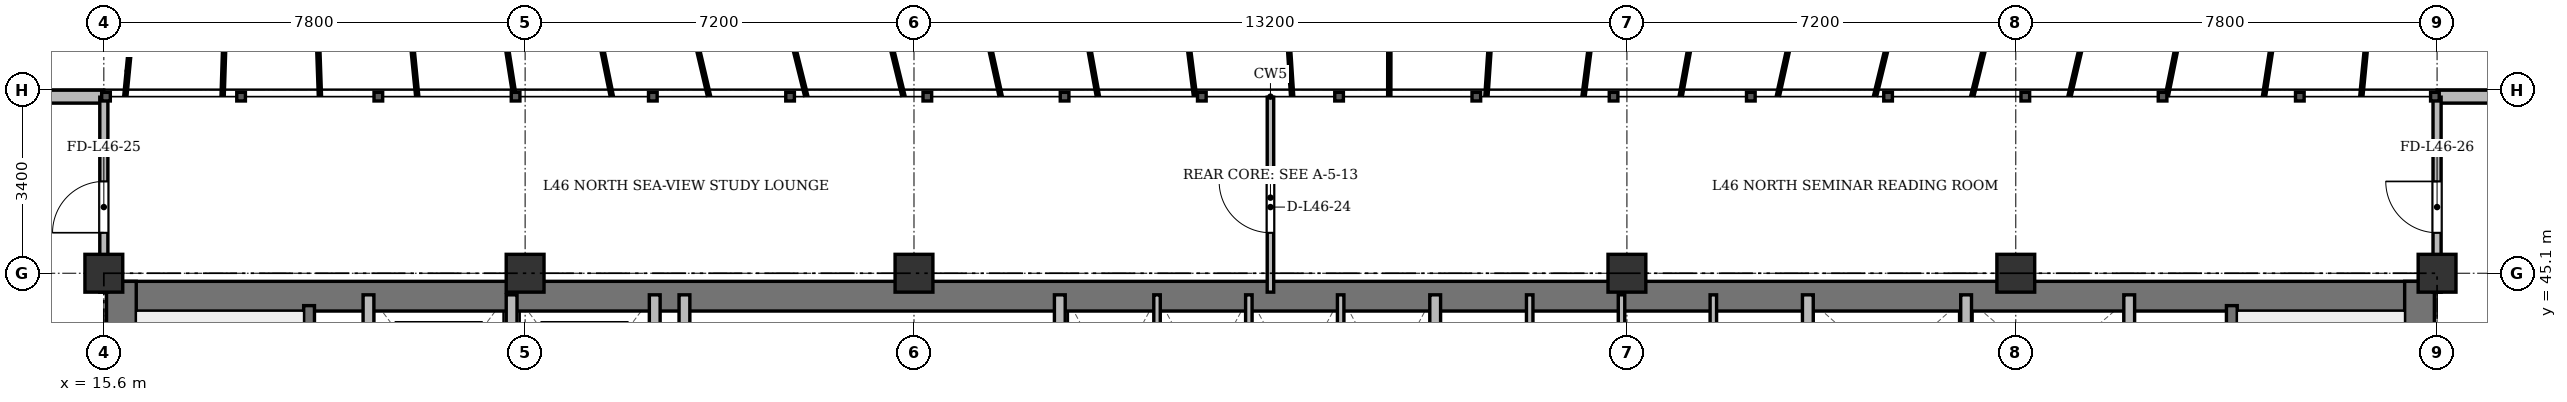
"""IFC4 building model, lengths in metres.
Left out: names, types, materials, properties, quantities, classifications, styles, units other than length and angle.
Written with IfcOpenShell. Run it as: python <this file> out.ifc"""

import sys

from ifc_helpers import new_model, si_unit, direction, frame, frame_2d, origin, origin_2d, place, context, subcontext, project, spatial, rectangle, extrude, source, transform, mapped, element, fill, save


model = new_model("IFC4")
c1 = context("Model", 3, precision=1e-05, world=origin(), true_north=direction((0.0, 1.0)))
c2 = subcontext(c1, "Body", "Model", "MODEL_VIEW")
j1 = project(units=[si_unit("LENGTHUNIT", "METRE"), si_unit("PLANEANGLEUNIT", "RADIAN")], contexts=[c1])
p1 = place(None, origin())
s1 = spatial("IfcSite", under=j1, at=p1, CompositionType="ELEMENT")
p2 = place(p1, origin())
s2 = spatial("IfcBuilding", under=s1, at=p2, CompositionType="ELEMENT")
p3 = place(p2, frame((0.0, 0.0, 175.3)))
s3 = spatial("IfcBuildingStorey", under=s2, at=p3, CompositionType="ELEMENT", Elevation=175.3)
m1 = source(origin(), c2, "Body", "SweptSolid", [
    extrude(rectangle(XDim=0.7, YDim=0.7, at=origin_2d()), origin(), (0.0, 0.0, 1.0), 3.6),
])
for number, where, z_axis, x_axis in (
    (1, (15.6, 45.1, 0.0), (0.0, 0.0, 1.0), (1.0, 0.0, 0.0)),
    (2, (23.4, 45.1, 0.0), (0.0, 0.0, 1.0), (1.0, 0.0, 0.0)),
    (3, (30.6, 45.1, 0.0), (0.0, 0.0, 1.0), (1.0, 0.0, 0.0)),
    (4, (43.8, 45.1, 0.0), (0.0, 0.0, 1.0), (1.0, 0.0, 0.0)),
    (5, (51.0, 45.1, 0.0), (0.0, 0.0, 1.0), (1.0, 0.0, 0.0)),
    (6, (58.8, 45.1, 0.0), (0.0, 0.0, 1.0), (1.0, 0.0, 0.0)),
):
    element("IfcColumn", number, at=place(p3, frame(where, z_axis=z_axis, x_axis=x_axis)), inside=s3, PredefinedType="COLUMN", context=c2, shape_type="MappedRepresentation", body=[
        mapped(m1, transform((0.0, 0.0, 0.0), x_axis=(1.0, 0.0, 0.0), y_axis=(0.0, 1.0, 0.0), z_axis=(0.0, 0.0, 1.0), scale=1.0)),
    ])
p4 = place(p3, frame((10.9, 48.37, 0.0), z_axis=(0.0, 0.0, 1.0), x_axis=(1.0, 0.0, 0.0)))
e7 = element("IfcWall", 7, at=p4, inside=s3, PredefinedType="SOLIDWALL", context=c2, shape_type="SweptSolid", body=[
    extrude(rectangle(XDim=4.7, YDim=0.24, at=frame_2d((2.35, 0.0))), origin(), (0.0, 0.0, 1.0), 3.35),
])
p5 = place(p4, frame((2.132, 0.0, 0.9)))
e8 = element("IfcOpeningElement", 8, at=p5, cuts=e7, PredefinedType="OPENING", context=c2, shape_type="SweptSolid", body=[
    extrude(rectangle(XDim=1.2, YDim=1.65, at=frame_2d((0.6, 0.825))), frame((0.0, 0.13, 0.0), z_axis=(0.0, -1.0, 0.0), x_axis=(1.0, 0.0, 0.0)), (0.0, 0.0, 1.0), 0.26),
])
p6 = place(p3, frame((58.8, 48.37, 0.0), z_axis=(0.0, 0.0, 1.0), x_axis=(1.0, 0.0, 0.0)))
e9 = element("IfcWall", 9, at=p6, inside=s3, PredefinedType="SOLIDWALL", context=c2, shape_type="SweptSolid", body=[
    extrude(rectangle(XDim=4.7, YDim=0.24, at=frame_2d((2.35, 0.0))), origin(), (0.0, 0.0, 1.0), 3.35),
])
p7 = place(p6, frame((1.659, 0.0, 0.9)))
e10 = element("IfcOpeningElement", 10, at=p7, cuts=e9, PredefinedType="OPENING", context=c2, shape_type="SweptSolid", body=[
    extrude(rectangle(XDim=1.2, YDim=1.65, at=frame_2d((0.6, 0.825))), frame((0.0, 0.13, 0.0), z_axis=(0.0, -1.0, 0.0), x_axis=(1.0, 0.0, 0.0)), (0.0, 0.0, 1.0), 0.26),
])
p8 = place(p3, frame((15.65, 44.675, 0.0), z_axis=(0.0, 0.0, 1.0), x_axis=(1.0, 0.0, 0.0)))
e11 = element("IfcWall", 11, at=p8, inside=s3, PredefinedType="SHEAR", context=c2, shape_type="SweptSolid", body=[
    extrude(rectangle(XDim=43.1, YDim=0.55, at=frame_2d((21.55, 0.0))), origin(), (0.0, 0.0, 1.0), 3.35),
])
for number, where, z_axis, x_axis in (
    (12, (15.925, 33.4, 0.0), (0.0, 0.0, 1.0), (0.0, 1.0, 0.0)),
    (13, (58.475, 33.4, 0.0), (0.0, 0.0, 1.0), (0.0, 1.0, 0.0)),
):
    element("IfcWall", number, at=place(p3, frame(where, z_axis=z_axis, x_axis=x_axis)), inside=s3, PredefinedType="SHEAR", context=c2, shape_type="SweptSolid", body=[
        extrude(rectangle(XDim=11.55, YDim=0.55, at=frame_2d((5.775, 0.0))), origin(), (0.0, 0.0, 1.0), 3.35),
    ])
p9 = place(p3, frame((19.4, 33.4, 0.0), z_axis=(0.0, 0.0, 1.0), x_axis=(0.0, 1.0, 0.0)))
e14 = element("IfcWall", 14, at=p9, inside=s3, PredefinedType="SHEAR", context=c2, shape_type="SweptSolid", body=[
    extrude(rectangle(XDim=11.1, YDim=0.2, at=frame_2d((5.55, 0.0))), origin(), (0.0, 0.0, 1.0), 3.35),
])
p10 = place(p9, frame((0.85, 0.0, 0.0)))
e15 = element("IfcOpeningElement", 15, at=p10, cuts=e14, PredefinedType="OPENING", context=c2, shape_type="SweptSolid", body=[
    extrude(rectangle(XDim=1.1, YDim=2.15, at=frame_2d((0.55, 1.075))), frame((0.0, 0.11, 0.0), z_axis=(0.0, -1.0, 0.0), x_axis=(1.0, 0.0, 0.0)), (0.0, 0.0, 1.0), 0.22),
])
p11 = place(p3, frame((55.0, 33.4, 0.0), z_axis=(0.0, 0.0, 1.0), x_axis=(0.0, 1.0, 0.0)))
e16 = element("IfcWall", 16, at=p11, inside=s3, PredefinedType="SHEAR", context=c2, shape_type="SweptSolid", body=[
    extrude(rectangle(XDim=11.1, YDim=0.2, at=frame_2d((5.55, 0.0))), origin(), (0.0, 0.0, 1.0), 3.35),
])
p12 = place(p11, frame((0.85, 0.0, 0.0)))
e17 = element("IfcOpeningElement", 17, at=p12, cuts=e16, PredefinedType="OPENING", context=c2, shape_type="SweptSolid", body=[
    extrude(rectangle(XDim=1.1, YDim=2.15, at=frame_2d((0.55, 1.075))), frame((0.0, 0.11, 0.0), z_axis=(0.0, -1.0, 0.0), x_axis=(1.0, 0.0, 0.0)), (0.0, 0.0, 1.0), 0.22),
])
for number, where, z_axis, x_axis in (
    (18, (20.5, 41.3, 0.0), (0.0, 0.0, 1.0), (0.0, 1.0, 0.0)),
    (19, (23.15, 41.3, 0.0), (0.0, 0.0, 1.0), (0.0, 1.0, 0.0)),
    (20, (25.8, 41.3, 0.0), (0.0, 0.0, 1.0), (0.0, 1.0, 0.0)),
):
    element("IfcWall", number, at=place(p3, frame(where, z_axis=z_axis, x_axis=x_axis)), inside=s3, PredefinedType="SOLIDWALL", context=c2, shape_type="SweptSolid", body=[
        extrude(rectangle(XDim=3.4, YDim=0.2, at=frame_2d((1.7, 0.0))), origin(), (0.0, 0.0, 1.0), 3.35),
    ])
for number, where, z_axis, x_axis in (
    (21, (26.35, 33.4, 0.0), (0.0, 0.0, 1.0), (0.0, 1.0, 0.0)),
    (22, (33.3, 33.4, 0.0), (0.0, 0.0, 1.0), (0.0, 1.0, 0.0)),
):
    element("IfcWall", number, at=place(p3, frame(where, z_axis=z_axis, x_axis=x_axis)), inside=s3, PredefinedType="SOLIDWALL", context=c2, shape_type="SweptSolid", body=[
        extrude(rectangle(XDim=11.3, YDim=0.2, at=frame_2d((5.65, 0.0))), origin(), (0.0, 0.0, 1.0), 2.75),
    ])
for number, where, z_axis, x_axis in (
    (23, (35.1, 41.5, 0.0), (0.0, 0.0, 1.0), (0.0, 1.0, 0.0)),
    (24, (36.8, 41.5, 0.0), (0.0, 0.0, 1.0), (0.0, 1.0, 0.0)),
    (25, (38.5, 41.5, 0.0), (0.0, 0.0, 1.0), (0.0, 1.0, 0.0)),
):
    element("IfcWall", number, at=place(p3, frame(where, z_axis=z_axis, x_axis=x_axis)), inside=s3, PredefinedType="PARTITIONING", context=c2, shape_type="SweptSolid", body=[
        extrude(rectangle(XDim=3.2, YDim=0.12, at=frame_2d((1.6, 0.0))), origin(), (0.0, 0.0, 1.0), 3.35),
    ])
p13 = place(p3, frame((40.25, 41.5, 0.0), z_axis=(0.0, 0.0, 1.0), x_axis=(0.0, 1.0, 0.0)))
e26 = element("IfcWall", 26, at=p13, inside=s3, PredefinedType="SOLIDWALL", context=c2, shape_type="SweptSolid", body=[
    extrude(rectangle(XDim=3.2, YDim=0.2, at=frame_2d((1.6, 0.0))), origin(), (0.0, 0.0, 1.0), 3.35),
])
p14 = place(p3, frame((42.0, 41.5, 0.0), z_axis=(0.0, 0.0, 1.0), x_axis=(0.0, 1.0, 0.0)))
e27 = element("IfcWall", 27, at=p14, inside=s3, PredefinedType="PARTITIONING", context=c2, shape_type="SweptSolid", body=[
    extrude(rectangle(XDim=3.2, YDim=0.12, at=frame_2d((1.6, 0.0))), origin(), (0.0, 0.0, 1.0), 3.35),
])
p15 = place(p3, frame((43.7, 41.5, 0.0), z_axis=(0.0, 0.0, 1.0), x_axis=(0.0, 1.0, 0.0)))
e28 = element("IfcWall", 28, at=p15, inside=s3, PredefinedType="PARTITIONING", context=c2, shape_type="SweptSolid", body=[
    extrude(rectangle(XDim=3.2, YDim=0.12, at=frame_2d((1.6, 0.0))), origin(), (0.0, 0.0, 1.0), 2.85),
])
p16 = place(p3, frame((45.4, 41.5, 0.0), z_axis=(0.0, 0.0, 1.0), x_axis=(0.0, 1.0, 0.0)))
e29 = element("IfcWall", 29, at=p16, inside=s3, PredefinedType="PARTITIONING", context=c2, shape_type="SweptSolid", body=[
    extrude(rectangle(XDim=3.2, YDim=0.12, at=frame_2d((1.6, 0.0))), origin(), (0.0, 0.0, 1.0), 3.35),
])
p17 = place(p3, frame((47.15, 33.4, 0.0), z_axis=(0.0, 0.0, 1.0), x_axis=(0.0, 1.0, 0.0)))
e30 = element("IfcWall", 30, at=p17, inside=s3, PredefinedType="SOLIDWALL", context=c2, shape_type="SweptSolid", body=[
    extrude(rectangle(XDim=11.3, YDim=0.2, at=frame_2d((5.65, 0.0))), origin(), (0.0, 0.0, 1.0), 2.75),
])
for number, where, z_axis, x_axis in (
    (31, (50.08, 42.05, 0.0), (0.0, 0.0, 1.0), (0.0, 1.0, 0.0)),
    (32, (53.1, 42.05, 0.0), (0.0, 0.0, 1.0), (0.0, 1.0, 0.0)),
):
    element("IfcWall", number, at=place(p3, frame(where, z_axis=z_axis, x_axis=x_axis)), inside=s3, PredefinedType="SOLIDWALL", context=c2, shape_type="SweptSolid", body=[
        extrude(rectangle(XDim=2.65, YDim=0.2, at=frame_2d((1.325, 0.0))), origin(), (0.0, 0.0, 1.0), 3.35),
    ])
p18 = place(p3, frame((37.2, 44.75, 0.0), z_axis=(0.0, 0.0, 1.0), x_axis=(0.0, 1.0, 0.0)))
e33 = element("IfcWall", 33, at=p18, inside=s3, PredefinedType="PARTITIONING", context=c2, shape_type="SweptSolid", body=[
    extrude(rectangle(XDim=3.61, YDim=0.12, at=frame_2d((1.805, 0.0))), origin(), (0.0, 0.0, 1.0), 2.75),
])
p19 = place(p18, frame((1.1, 0.0, 0.0)))
e34 = element("IfcOpeningElement", 34, at=p19, cuts=e33, PredefinedType="OPENING", context=c2, shape_type="SweptSolid", body=[
    extrude(rectangle(XDim=0.95, YDim=2.15, at=frame_2d((0.475, 1.075))), frame((0.0, 0.07, 0.0), z_axis=(0.0, -1.0, 0.0), x_axis=(1.0, 0.0, 0.0)), (0.0, 0.0, 1.0), 0.14),
])
p20 = place(p3, frame((15.6, 44.75, 0.0), z_axis=(0.0, 0.0, 1.0), x_axis=(0.0, 1.0, 0.0)))
e35 = element("IfcWall", 35, at=p20, inside=s3, PredefinedType="PARTITIONING", context=c2, shape_type="SweptSolid", body=[
    extrude(rectangle(XDim=3.61, YDim=0.15, at=frame_2d((1.805, 0.0))), origin(), (0.0, 0.0, 1.0), 2.85),
])
p21 = place(p20, frame((1.1, 0.0, 0.0)))
e36 = element("IfcOpeningElement", 36, at=p21, cuts=e35, PredefinedType="OPENING", context=c2, shape_type="SweptSolid", body=[
    extrude(rectangle(XDim=0.95, YDim=2.15, at=frame_2d((0.475, 1.075))), frame((0.0, 0.085, 0.0), z_axis=(0.0, -1.0, 0.0), x_axis=(1.0, 0.0, 0.0)), (0.0, 0.0, 1.0), 0.17),
])
p22 = place(p3, frame((58.8, 44.75, 0.0), z_axis=(0.0, 0.0, 1.0), x_axis=(0.0, 1.0, 0.0)))
e37 = element("IfcWall", 37, at=p22, inside=s3, PredefinedType="PARTITIONING", context=c2, shape_type="SweptSolid", body=[
    extrude(rectangle(XDim=3.61, YDim=0.15, at=frame_2d((1.805, 0.0))), origin(), (0.0, 0.0, 1.0), 2.85),
])
p23 = place(p22, frame((1.1, 0.0, 0.0)))
e38 = element("IfcOpeningElement", 38, at=p23, cuts=e37, PredefinedType="OPENING", context=c2, shape_type="SweptSolid", body=[
    extrude(rectangle(XDim=0.95, YDim=2.15, at=frame_2d((0.475, 1.075))), frame((0.0, 0.085, 0.0), z_axis=(0.0, -1.0, 0.0), x_axis=(1.0, 0.0, 0.0)), (0.0, 0.0, 1.0), 0.17),
])
m2 = source(origin(), c2, "Body", "SweptSolid", [
    extrude(rectangle(XDim=0.95, YDim=2.15, at=frame_2d((0.475, 1.075))), frame((0.0, 0.025, 0.0), z_axis=(0.0, -1.0, 0.0), x_axis=(1.0, 0.0, 0.0)), (0.0, 0.0, 1.0), 0.05),
])
p24 = place(p19, origin())
e39 = element("IfcDoor", 39, at=p24, inside=s3, OperationType="SINGLE_SWING_RIGHT", PredefinedType="DOOR", context=c2, shape_type="MappedRepresentation", body=[
    mapped(m2, transform((0.0, 0.0, 0.0), x_axis=(1.0, 0.0, 0.0), y_axis=(0.0, 1.0, 0.0), z_axis=(0.0, 0.0, 1.0), scale=1.0)),
])
fill(e34, e39)
p25 = place(p21, origin())
e40 = element("IfcDoor", 40, at=p25, inside=s3, OperationType="SINGLE_SWING_LEFT", PredefinedType="DOOR", context=c2, shape_type="MappedRepresentation", body=[
    mapped(m2, transform((0.0, 0.0, 0.0), x_axis=(1.0, 0.0, 0.0), y_axis=(0.0, 1.0, 0.0), z_axis=(0.0, 0.0, 1.0), scale=1.0)),
])
fill(e36, e40)
p26 = place(p23, origin())
e41 = element("IfcDoor", 41, at=p26, inside=s3, OperationType="SINGLE_SWING_RIGHT", PredefinedType="DOOR", context=c2, shape_type="MappedRepresentation", body=[
    mapped(m2, transform((0.0, 0.0, 0.0), x_axis=(1.0, 0.0, 0.0), y_axis=(0.0, 1.0, 0.0), z_axis=(0.0, 0.0, 1.0), scale=1.0)),
])
fill(e38, e41)
save(model, sys.argv[1])
